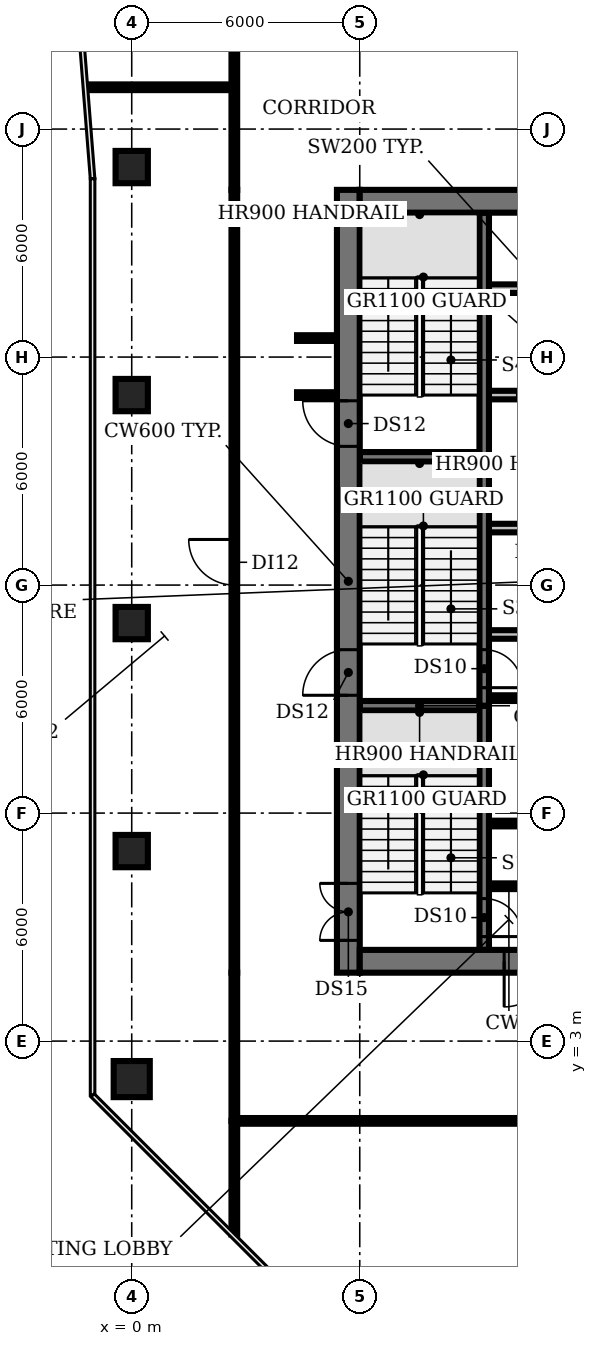
"""IFC4 building model, lengths in metres.
Left out: names, types, materials, properties, quantities, classifications, styles, units other than length and angle.
Written with IfcOpenShell. Run it as: python <this file> out.ifc"""

import sys

from ifc_helpers import new_model, si_unit, direction, frame, frame_2d, origin, origin_2d, place, context, subcontext, project, spatial, rectangle, circle, extrude, element, fill, save


model = new_model("IFC4")
c1 = context("Model", 3, precision=1e-05, world=origin(), true_north=direction((0.0, 1.0)))
c2 = subcontext(c1, "Body", "Model", "MODEL_VIEW")
j1 = project(units=[si_unit("LENGTHUNIT", "METRE"), si_unit("PLANEANGLEUNIT", "RADIAN")], contexts=[c1])
p1 = place(None, origin())
s1 = spatial("IfcSite", under=j1, at=p1, CompositionType="ELEMENT")
p2 = place(p1, origin())
s2 = spatial("IfcBuilding", under=s1, at=p2, CompositionType="ELEMENT")
p3 = place(p2, frame((0.0, 0.0, 188.6)))
s3 = spatial("IfcBuildingStorey", under=s2, at=p3, CompositionType="ELEMENT", Elevation=188.6)
p4 = place(p3, frame((0.0, 2.0, 0.0), z_axis=(0.0, 0.0, 1.0), x_axis=(1.0, 0.0, 0.0)))
e1 = element("IfcColumn", 1, at=p4, inside=s3, PredefinedType="COLUMN", context=c2, shape_type="SweptSolid", body=[
    extrude(circle(Radius=0.475, at=origin_2d()), origin(), (0.0, 0.0, 1.0), 3.85),
])
for number, where, z_axis, x_axis in (
    (2, (0.0, 8.0, 0.0), (0.0, 0.0, 1.0), (1.0, 0.0, 0.0)),
    (3, (0.0, 14.0, 0.0), (0.0, 0.0, 1.0), (1.0, 0.0, 0.0)),
    (4, (0.0, 20.0, 0.0), (0.0, 0.0, 1.0), (1.0, 0.0, 0.0)),
    (5, (0.0, 26.0, 0.0), (0.0, 0.0, 1.0), (1.0, 0.0, 0.0)),
):
    element("IfcColumn", number, at=place(p3, frame(where, z_axis=z_axis, x_axis=x_axis)), inside=s3, PredefinedType="COLUMN", context=c2, shape_type="SweptSolid", body=[
        extrude(rectangle(XDim=0.85, YDim=0.85, at=origin_2d()), origin(), (0.0, 0.0, 1.0), 3.85),
    ])
for number, where, z_axis, x_axis in (
    (6, (9.4, 7.075, 0.0), (0.0, 0.0, 1.0), (1.0, 0.0, 0.0)),
    (7, (9.4, 8.725, 0.0), (0.0, 0.0, 1.0), (1.0, 0.0, 0.0)),
    (8, (9.4, 10.375, 0.0), (0.0, 0.0, 1.0), (1.0, 0.0, 0.0)),
):
    element("IfcWall", number, at=place(p3, frame(where, z_axis=z_axis, x_axis=x_axis)), inside=s3, PredefinedType="SHEAR", context=c2, shape_type="SweptSolid", body=[
        extrude(rectangle(XDim=1.05, YDim=0.15, at=frame_2d((0.525, 0.0))), origin(), (0.0, 0.0, 1.0), 3.85),
    ])
p5 = place(p3, frame((6.0, 11.825, 0.0), z_axis=(0.0, 0.0, 1.0), x_axis=(1.0, 0.0, 0.0)))
e9 = element("IfcWall", 9, at=p5, inside=s3, PredefinedType="SHEAR", context=c2, shape_type="SweptSolid", body=[
    extrude(rectangle(XDim=3.15, YDim=0.25, at=frame_2d((1.575, 0.0))), origin(), (0.0, 0.0, 1.0), 3.85),
])
p6 = place(p3, frame((9.4, 12.025, 0.0), z_axis=(0.0, 0.0, 1.0), x_axis=(1.0, 0.0, 0.0)))
e10 = element("IfcWall", 10, at=p6, inside=s3, PredefinedType="SHEAR", context=c2, shape_type="SweptSolid", body=[
    extrude(rectangle(XDim=1.05, YDim=0.15, at=frame_2d((0.525, 0.0))), origin(), (0.0, 0.0, 1.0), 3.85),
])
p7 = place(p3, frame((9.4, 13.7, 0.0), z_axis=(0.0, 0.0, 1.0), x_axis=(1.0, 0.0, 0.0)))
e11 = element("IfcWall", 11, at=p7, inside=s3, PredefinedType="PARTITIONING", context=c2, shape_type="SweptSolid", body=[
    extrude(rectangle(XDim=4.0, YDim=0.225, at=frame_2d((2.0, 0.0))), origin(), (0.0, 0.0, 1.0), 3.85),
])
p8 = place(p3, frame((9.4, 16.5, 0.0), z_axis=(0.0, 0.0, 1.0), x_axis=(1.0, 0.0, 0.0)))
e12 = element("IfcWall", 12, at=p8, inside=s3, PredefinedType="PARTITIONING", context=c2, shape_type="SweptSolid", body=[
    extrude(rectangle(XDim=14.6, YDim=0.225, at=frame_2d((7.3, 0.0))), origin(), (0.0, 0.0, 1.0), 3.85),
])
p9 = place(p8, frame((0.85, 0.0, 0.0)))
e13 = element("IfcOpeningElement", 13, at=p9, cuts=e12, PredefinedType="OPENING", context=c2, shape_type="SweptSolid", body=[
    extrude(rectangle(XDim=0.9, YDim=2.1, at=frame_2d((0.45, 1.05))), frame((0.0, 0.123, 0.0), z_axis=(0.0, -1.0, 0.0), x_axis=(1.0, 0.0, 0.0)), (0.0, 0.0, 1.0), 0.245),
])
p10 = place(p8, frame((3.625, 0.0, 0.0)))
e14 = element("IfcOpeningElement", 14, at=p10, cuts=e12, PredefinedType="OPENING", context=c2, shape_type="SweptSolid", body=[
    extrude(rectangle(XDim=0.9, YDim=2.1, at=frame_2d((0.45, 1.05))), frame((0.0, 0.123, 0.0), z_axis=(0.0, -1.0, 0.0), x_axis=(1.0, 0.0, 0.0)), (0.0, 0.0, 1.0), 0.245),
])
p11 = place(p8, frame((7.775, 0.0, 0.0)))
e15 = element("IfcOpeningElement", 15, at=p11, cuts=e12, PredefinedType="OPENING", context=c2, shape_type="SweptSolid", body=[
    extrude(rectangle(XDim=1.0, YDim=2.1, at=frame_2d((0.5, 1.05))), frame((0.0, 0.123, 0.0), z_axis=(0.0, -1.0, 0.0), x_axis=(1.0, 0.0, 0.0)), (0.0, 0.0, 1.0), 0.245),
])
p12 = place(p8, frame((12.4, 0.0, 0.0)))
e16 = element("IfcOpeningElement", 16, at=p12, cuts=e12, PredefinedType="OPENING", context=c2, shape_type="SweptSolid", body=[
    extrude(rectangle(XDim=1.0, YDim=2.1, at=frame_2d((0.5, 1.05))), frame((0.0, 0.123, 0.0), z_axis=(0.0, -1.0, 0.0), x_axis=(1.0, 0.0, 0.0)), (0.0, 0.0, 1.0), 0.245),
])
p13 = place(p3, frame((6.0, 18.375, 0.0), z_axis=(0.0, 0.0, 1.0), x_axis=(1.0, 0.0, 0.0)))
e17 = element("IfcWall", 17, at=p13, inside=s3, PredefinedType="SHEAR", context=c2, shape_type="SweptSolid", body=[
    extrude(rectangle(XDim=3.15, YDim=0.25, at=frame_2d((1.575, 0.0))), origin(), (0.0, 0.0, 1.0), 3.85),
])
p14 = place(p3, frame((24.0, 20.0, 0.0), z_axis=(0.0, 0.0, 1.0), x_axis=(-1.0, 0.0, 0.0)))
e18 = element("IfcWall", 18, at=p14, inside=s3, PredefinedType="PARTITIONING", context=c2, shape_type="SweptSolid", body=[
    extrude(rectangle(XDim=14.6, YDim=0.225, at=frame_2d((7.3, 0.0))), origin(), (0.0, 0.0, 1.0), 3.85),
])
p15 = place(p14, frame((12.75, 0.0, 0.0)))
e19 = element("IfcOpeningElement", 19, at=p15, cuts=e18, PredefinedType="OPENING", context=c2, shape_type="SweptSolid", body=[
    extrude(rectangle(XDim=1.1, YDim=2.1, at=frame_2d((0.55, 1.05))), frame((0.0, 0.123, 0.0), z_axis=(0.0, -1.0, 0.0), x_axis=(1.0, 0.0, 0.0)), (0.0, 0.0, 1.0), 0.245),
])
p16 = place(p14, frame((9.95, 0.0, 0.0)))
e20 = element("IfcOpeningElement", 20, at=p16, cuts=e18, PredefinedType="OPENING", context=c2, shape_type="SweptSolid", body=[
    extrude(rectangle(XDim=1.1, YDim=2.1, at=frame_2d((0.55, 1.05))), frame((0.0, 0.123, 0.0), z_axis=(0.0, -1.0, 0.0), x_axis=(1.0, 0.0, 0.0)), (0.0, 0.0, 1.0), 0.245),
])
p17 = place(p14, frame((7.15, 0.0, 0.0)))
e21 = element("IfcOpeningElement", 21, at=p17, cuts=e18, PredefinedType="OPENING", context=c2, shape_type="SweptSolid", body=[
    extrude(rectangle(XDim=1.1, YDim=2.1, at=frame_2d((0.55, 1.05))), frame((0.0, 0.123, 0.0), z_axis=(0.0, -1.0, 0.0), x_axis=(1.0, 0.0, 0.0)), (0.0, 0.0, 1.0), 0.245),
])
p18 = place(p14, frame((4.35, 0.0, 0.0)))
e22 = element("IfcOpeningElement", 22, at=p18, cuts=e18, PredefinedType="OPENING", context=c2, shape_type="SweptSolid", body=[
    extrude(rectangle(XDim=1.1, YDim=2.1, at=frame_2d((0.55, 1.05))), frame((0.0, 0.123, 0.0), z_axis=(0.0, -1.0, 0.0), x_axis=(1.0, 0.0, 0.0)), (0.0, 0.0, 1.0), 0.245),
])
p19 = place(p14, frame((1.2, 0.0, 0.0)))
e23 = element("IfcOpeningElement", 23, at=p19, cuts=e18, PredefinedType="OPENING", context=c2, shape_type="SweptSolid", body=[
    extrude(rectangle(XDim=1.0, YDim=2.1, at=frame_2d((0.5, 1.05))), frame((0.0, 0.123, 0.0), z_axis=(0.0, -1.0, 0.0), x_axis=(1.0, 0.0, 0.0)), (0.0, 0.0, 1.0), 0.245),
])
p20 = place(p3, frame((9.4, 22.8, 0.0), z_axis=(0.0, 0.0, 1.0), x_axis=(1.0, 0.0, 0.0)))
e24 = element("IfcWall", 24, at=p20, inside=s3, PredefinedType="PARTITIONING", context=c2, shape_type="SweptSolid", body=[
    extrude(rectangle(XDim=14.6, YDim=0.225, at=frame_2d((7.3, 0.0))), origin(), (0.0, 0.0, 1.0), 3.85),
])
p21 = place(p3, frame((9.275, 11.825, 0.0), z_axis=(0.0, 0.0, 1.0), x_axis=(0.0, -1.0, 0.0)))
e25 = element("IfcWall", 25, at=p21, inside=s3, PredefinedType="SHEAR", context=c2, shape_type="SweptSolid", body=[
    extrude(rectangle(XDim=6.425, YDim=0.25, at=frame_2d((3.212, 0.0))), origin(), (0.0, 0.0, 1.0), 3.85),
])
p22 = place(p21, frame((5.075, 0.0, 0.0)))
e26 = element("IfcOpeningElement", 26, at=p22, cuts=e25, PredefinedType="OPENING", context=c2, shape_type="SweptSolid", body=[
    extrude(rectangle(XDim=1.0, YDim=2.1, at=frame_2d((0.5, 1.05))), frame((0.0, 0.135, 0.0), z_axis=(0.0, -1.0, 0.0), x_axis=(1.0, 0.0, 0.0)), (0.0, 0.0, 1.0), 0.27),
])
p23 = place(p3, frame((9.275, 18.375, 0.0), z_axis=(0.0, 0.0, 1.0), x_axis=(0.0, -1.0, 0.0)))
e27 = element("IfcWall", 27, at=p23, inside=s3, PredefinedType="SHEAR", context=c2, shape_type="SweptSolid", body=[
    extrude(rectangle(XDim=6.55, YDim=0.25, at=frame_2d((3.275, 0.0))), origin(), (0.0, 0.0, 1.0), 3.85),
])
p24 = place(p23, frame((5.075, 0.0, 0.0)))
e28 = element("IfcOpeningElement", 28, at=p24, cuts=e27, PredefinedType="OPENING", context=c2, shape_type="SweptSolid", body=[
    extrude(rectangle(XDim=1.0, YDim=2.1, at=frame_2d((0.5, 1.05))), frame((0.0, 0.135, 0.0), z_axis=(0.0, -1.0, 0.0), x_axis=(1.0, 0.0, 0.0)), (0.0, 0.0, 1.0), 0.27),
])
p25 = place(p3, frame((9.275, 18.375, 0.0), z_axis=(0.0, 0.0, 1.0), x_axis=(0.0, 1.0, 0.0)))
e29 = element("IfcWall", 29, at=p25, inside=s3, PredefinedType="SHEAR", context=c2, shape_type="SweptSolid", body=[
    extrude(rectangle(XDim=6.425, YDim=0.25, at=frame_2d((3.212, 0.0))), origin(), (0.0, 0.0, 1.0), 3.85),
])
p26 = place(p3, frame((5.7, 4.8, 0.0), z_axis=(0.0, 0.0, 1.0), x_axis=(0.0, 1.0, 0.0)))
e30 = element("IfcWall", 30, at=p26, inside=s3, PredefinedType="SHEAR", context=c2, shape_type="SweptSolid", body=[
    extrude(rectangle(XDim=20.6, YDim=0.6, at=frame_2d((10.3, 0.0))), origin(), (0.0, 0.0, 1.0), 3.85),
])
p27 = place(p26, frame((0.85, 0.0, 0.0)))
e31 = element("IfcOpeningElement", 31, at=p27, cuts=e30, PredefinedType="OPENING", context=c2, shape_type="SweptSolid", body=[
    extrude(rectangle(XDim=1.5, YDim=2.1, at=frame_2d((0.75, 1.05))), frame((0.0, 0.31, 0.0), z_axis=(0.0, -1.0, 0.0), x_axis=(1.0, 0.0, 0.0)), (0.0, 0.0, 1.0), 0.62),
])
p28 = place(p26, frame((7.3, 0.0, 0.0)))
e32 = element("IfcOpeningElement", 32, at=p28, cuts=e30, PredefinedType="OPENING", context=c2, shape_type="SweptSolid", body=[
    extrude(rectangle(XDim=1.2, YDim=2.1, at=frame_2d((0.6, 1.05))), frame((0.0, 0.31, 0.0), z_axis=(0.0, -1.0, 0.0), x_axis=(1.0, 0.0, 0.0)), (0.0, 0.0, 1.0), 0.62),
])
p29 = place(p26, frame((13.85, 0.0, 0.0)))
e33 = element("IfcOpeningElement", 33, at=p29, cuts=e30, PredefinedType="OPENING", context=c2, shape_type="SweptSolid", body=[
    extrude(rectangle(XDim=1.2, YDim=2.1, at=frame_2d((0.6, 1.05))), frame((0.0, 0.31, 0.0), z_axis=(0.0, -1.0, 0.0), x_axis=(1.0, 0.0, 0.0)), (0.0, 0.0, 1.0), 0.62),
])
p30 = place(p3, frame((24.0, 5.1, 0.0), z_axis=(0.0, 0.0, 1.0), x_axis=(-1.0, 0.0, 0.0)))
e34 = element("IfcWall", 34, at=p30, inside=s3, PredefinedType="SHEAR", context=c2, shape_type="SweptSolid", body=[
    extrude(rectangle(XDim=18.0, YDim=0.6, at=frame_2d((9.0, 0.0))), origin(), (0.0, 0.0, 1.0), 3.85),
])
p31 = place(p30, frame((13.0, 0.0, 0.0)))
e35 = element("IfcOpeningElement", 35, at=p31, cuts=e34, PredefinedType="OPENING", context=c2, shape_type="SweptSolid", body=[
    extrude(rectangle(XDim=1.2, YDim=2.1, at=frame_2d((0.6, 1.05))), frame((0.0, 0.31, 0.0), z_axis=(0.0, -1.0, 0.0), x_axis=(1.0, 0.0, 0.0)), (0.0, 0.0, 1.0), 0.62),
])
p32 = place(p30, frame((4.9, 0.0, 0.0)))
e36 = element("IfcOpeningElement", 36, at=p32, cuts=e34, PredefinedType="OPENING", context=c2, shape_type="SweptSolid", body=[
    extrude(rectangle(XDim=1.0, YDim=2.1, at=frame_2d((0.5, 1.05))), frame((0.0, 0.31, 0.0), z_axis=(0.0, -1.0, 0.0), x_axis=(1.0, 0.0, 0.0)), (0.0, 0.0, 1.0), 0.62),
])
p33 = place(p3, frame((6.0, 25.1, 0.0), z_axis=(0.0, 0.0, 1.0), x_axis=(1.0, 0.0, 0.0)))
e37 = element("IfcWall", 37, at=p33, inside=s3, PredefinedType="SHEAR", context=c2, shape_type="SweptSolid", body=[
    extrude(rectangle(XDim=18.0, YDim=0.6, at=frame_2d((9.0, 0.0))), origin(), (0.0, 0.0, 1.0), 3.85),
])
p34 = place(p3, frame((-1.17, 28.1, 0.0), z_axis=(0.0, 0.0, 1.0), x_axis=(1.0, 0.0, 0.0)))
e38 = element("IfcWall", 38, at=p34, inside=s3, PredefinedType="PARTITIONING", context=c2, shape_type="SweptSolid", body=[
    extrude(rectangle(XDim=3.87, YDim=0.15, at=frame_2d((1.935, 0.0))), origin(), (0.0, 0.0, 1.0), 2.88),
])
p35 = place(p3, frame((2.7, -2.09, 0.0), z_axis=(0.0, 0.0, 1.0), x_axis=(0.0, 1.0, 0.0)))
e39 = element("IfcWall", 39, at=p35, inside=s3, PredefinedType="PARTITIONING", context=c2, shape_type="SweptSolid", body=[
    extrude(rectangle(XDim=2.99, YDim=0.15, at=frame_2d((1.495, 0.0))), origin(), (0.0, 0.0, 1.0), 2.88),
])
p36 = place(p3, frame((2.7, 0.9, 0.0), z_axis=(0.0, 0.0, 1.0), x_axis=(0.0, 1.0, 0.0)))
e40 = element("IfcWall", 40, at=p36, inside=s3, PredefinedType="PARTITIONING", context=c2, shape_type="SweptSolid", body=[
    extrude(rectangle(XDim=3.9, YDim=0.15, at=frame_2d((1.95, 0.0))), origin(), (0.0, 0.0, 1.0), 2.88),
])
p37 = place(p3, frame((2.7, 4.8, 0.0), z_axis=(0.0, 0.0, 1.0), x_axis=(0.0, 1.0, 0.0)))
e41 = element("IfcWall", 41, at=p37, inside=s3, PredefinedType="PARTITIONING", context=c2, shape_type="SweptSolid", body=[
    extrude(rectangle(XDim=20.6, YDim=0.15, at=frame_2d((10.3, 0.0))), origin(), (0.0, 0.0, 1.0), 2.88),
])
p38 = place(p37, frame((10.2, 0.0, 0.0)))
e42 = element("IfcOpeningElement", 42, at=p38, cuts=e41, PredefinedType="OPENING", context=c2, shape_type="SweptSolid", body=[
    extrude(rectangle(XDim=1.2, YDim=2.1, at=frame_2d((0.6, 1.05))), frame((0.0, 0.085, 0.0), z_axis=(0.0, -1.0, 0.0), x_axis=(1.0, 0.0, 0.0)), (0.0, 0.0, 1.0), 0.17),
])
p39 = place(p3, frame((2.7, 25.4, 0.0), z_axis=(0.0, 0.0, 1.0), x_axis=(0.0, 1.0, 0.0)))
e43 = element("IfcWall", 43, at=p39, inside=s3, PredefinedType="PARTITIONING", context=c2, shape_type="SweptSolid", body=[
    extrude(rectangle(XDim=3.9, YDim=0.15, at=frame_2d((1.95, 0.0))), origin(), (0.0, 0.0, 1.0), 2.88),
])
for number, where, z_axis, x_axis in (
    (44, (4.35, 20.0, 0.0), (0.0, 0.0, 1.0), (1.0, 0.0, 0.0)),
    (45, (4.35, 21.5, 0.0), (0.0, 0.0, 1.0), (1.0, 0.0, 0.0)),
):
    element("IfcWall", number, at=place(p3, frame(where, z_axis=z_axis, x_axis=x_axis)), inside=s3, PredefinedType="PARTITIONING", context=c2, shape_type="SweptSolid", body=[
        extrude(rectangle(XDim=1.05, YDim=0.15, at=frame_2d((0.525, 0.0))), origin(), (0.0, 0.0, 1.0), 2.88),
    ])
p40 = place(p3, frame((27.3, 0.9, 0.0), z_axis=(0.0, 0.0, 1.0), x_axis=(-1.0, 0.0, 0.0)))
e46 = element("IfcWall", 46, at=p40, inside=s3, PredefinedType="PARTITIONING", context=c2, shape_type="SweptSolid", body=[
    extrude(rectangle(XDim=24.6, YDim=0.15, at=frame_2d((12.3, 0.0))), origin(), (0.0, 0.0, 1.0), 2.88),
])
p41 = place(p40, frame((11.8, 0.0, 0.0)))
e47 = element("IfcOpeningElement", 47, at=p41, cuts=e46, PredefinedType="OPENING", context=c2, shape_type="SweptSolid", body=[
    extrude(rectangle(XDim=1.2, YDim=2.1, at=frame_2d((0.6, 1.05))), frame((0.0, 0.085, 0.0), z_axis=(0.0, -1.0, 0.0), x_axis=(1.0, 0.0, 0.0)), (0.0, 0.0, 1.0), 0.17),
])
p42 = place(p22, origin())
e48 = element("IfcDoor", 48, at=p42, inside=s3, OperationType="SINGLE_SWING_RIGHT", PredefinedType="DOOR", context=c2, shape_type="SweptSolid", body=[
    extrude(rectangle(XDim=1.0, YDim=2.1, at=frame_2d((0.5, 1.05))), frame((0.0, 0.025, 0.0), z_axis=(0.0, -1.0, 0.0), x_axis=(1.0, 0.0, 0.0)), (0.0, 0.0, 1.0), 0.05),
])
fill(e26, e48)
p43 = place(p24, origin())
e49 = element("IfcDoor", 49, at=p43, inside=s3, OperationType="SINGLE_SWING_RIGHT", PredefinedType="DOOR", context=c2, shape_type="SweptSolid", body=[
    extrude(rectangle(XDim=1.0, YDim=2.1, at=frame_2d((0.5, 1.05))), frame((0.0, 0.025, 0.0), z_axis=(0.0, -1.0, 0.0), x_axis=(1.0, 0.0, 0.0)), (0.0, 0.0, 1.0), 0.05),
])
fill(e28, e49)
p44 = place(p27, origin())
e50 = element("IfcDoor", 50, at=p44, inside=s3, OperationType="DOUBLE_DOOR_SINGLE_SWING", PredefinedType="DOOR", context=c2, shape_type="SweptSolid", body=[
    extrude(rectangle(XDim=1.5, YDim=2.1, at=frame_2d((0.75, 1.05))), frame((0.0, 0.025, 0.0), z_axis=(0.0, -1.0, 0.0), x_axis=(1.0, 0.0, 0.0)), (0.0, 0.0, 1.0), 0.05),
])
fill(e31, e50)
p45 = place(p28, origin())
e51 = element("IfcDoor", 51, at=p45, inside=s3, OperationType="SINGLE_SWING_LEFT", PredefinedType="DOOR", context=c2, shape_type="SweptSolid", body=[
    extrude(rectangle(XDim=1.2, YDim=2.1, at=frame_2d((0.6, 1.05))), frame((0.0, 0.025, 0.0), z_axis=(0.0, -1.0, 0.0), x_axis=(1.0, 0.0, 0.0)), (0.0, 0.0, 1.0), 0.05),
])
fill(e32, e51)
p46 = place(p29, origin())
e52 = element("IfcDoor", 52, at=p46, inside=s3, OperationType="SINGLE_SWING_RIGHT", PredefinedType="DOOR", context=c2, shape_type="SweptSolid", body=[
    extrude(rectangle(XDim=1.2, YDim=2.1, at=frame_2d((0.6, 1.05))), frame((0.0, 0.025, 0.0), z_axis=(0.0, -1.0, 0.0), x_axis=(1.0, 0.0, 0.0)), (0.0, 0.0, 1.0), 0.05),
])
fill(e33, e52)
p47 = place(p31, origin())
e53 = element("IfcDoor", 53, at=p47, inside=s3, OperationType="SINGLE_SWING_RIGHT", PredefinedType="DOOR", context=c2, shape_type="SweptSolid", body=[
    extrude(rectangle(XDim=1.2, YDim=2.1, at=frame_2d((0.6, 1.05))), frame((0.0, 0.025, 0.0), z_axis=(0.0, -1.0, 0.0), x_axis=(1.0, 0.0, 0.0)), (0.0, 0.0, 1.0), 0.05),
])
fill(e35, e53)
p48 = place(p38, origin())
e54 = element("IfcDoor", 54, at=p48, inside=s3, OperationType="SINGLE_SWING_RIGHT", PredefinedType="DOOR", context=c2, shape_type="SweptSolid", body=[
    extrude(rectangle(XDim=1.2, YDim=2.1, at=frame_2d((0.6, 1.05))), frame((0.0, 0.025, 0.0), z_axis=(0.0, -1.0, 0.0), x_axis=(1.0, 0.0, 0.0)), (0.0, 0.0, 1.0), 0.05),
])
fill(e42, e54)
save(model, sys.argv[1])
